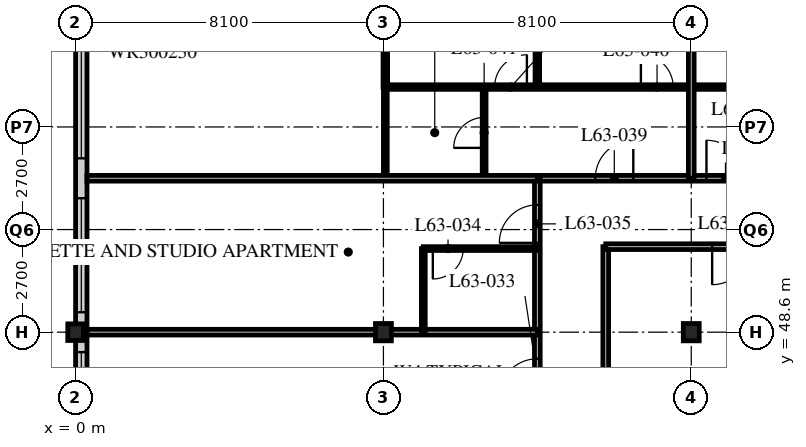
"""IFC4 building model, lengths in metres.
Left out: names, types, materials, properties, quantities, classifications, styles, units other than length and angle.
Written with IfcOpenShell. Run it as: python <this file> out.ifc"""

import sys

from ifc_helpers import new_model, si_unit, direction, frame, frame_2d, origin, origin_2d, place, context, subcontext, project, spatial, rectangle, i_section, extrude, element, fill, save


model = new_model("IFC4")
c1 = context("Model", 3, precision=1e-05, world=origin(), true_north=direction((0.0, 1.0)))
c2 = subcontext(c1, "Body", "Model", "MODEL_VIEW")
j1 = project(units=[si_unit("LENGTHUNIT", "METRE"), si_unit("PLANEANGLEUNIT", "RADIAN")], contexts=[c1])
p1 = place(None, origin())
s1 = spatial("IfcSite", under=j1, at=p1, CompositionType="ELEMENT")
p2 = place(p1, origin())
s2 = spatial("IfcBuilding", under=s1, at=p2, CompositionType="ELEMENT")
p3 = place(p2, frame((0.0, 0.0, 246.3)))
s3 = spatial("IfcBuildingStorey", under=s2, at=p3, CompositionType="ELEMENT", Elevation=246.3)
p4 = place(p3, frame((0.0, 48.6, 0.0), z_axis=(0.0, 0.0, 1.0), x_axis=(1.0, 0.0, 0.0)))
e1 = element("IfcColumn", 1, at=p4, inside=s3, PredefinedType="COLUMN", context=c2, shape_type="SweptSolid", body=[
    extrude(i_section(OverallWidth=0.412, OverallDepth=0.437, WebThickness=0.036, FlangeThickness=0.058, FilletRadius=0.015, at=origin_2d()), origin(), (0.0, 0.0, 1.0), 3.9),
])
for number, where, z_axis, x_axis in (
    (2, (8.1, 48.6, 0.0), (0.0, 0.0, 1.0), (1.0, 0.0, 0.0)),
    (3, (16.2, 48.6, 0.0), (0.0, 0.0, 1.0), (1.0, 0.0, 0.0)),
):
    element("IfcColumn", number, at=place(p3, frame(where, z_axis=z_axis, x_axis=x_axis)), inside=s3, PredefinedType="COLUMN", context=c2, shape_type="SweptSolid", body=[
        extrude(i_section(OverallWidth=0.418, OverallDepth=0.456, WebThickness=0.042, FlangeThickness=0.067, FilletRadius=0.015, at=origin_2d()), origin(), (0.0, 0.0, 1.0), 3.9),
    ])
p5 = place(p3, frame((0.15, 56.4, 0.0), z_axis=(0.0, 0.0, 1.0), x_axis=(0.0, -1.0, 0.0)))
e4 = element("IfcWall", 4, at=p5, inside=s3, PredefinedType="SOLIDWALL", context=c2, shape_type="SweptSolid", body=[
    extrude(rectangle(XDim=32.1, YDim=0.3, at=frame_2d((16.05, 0.0))), origin(), (0.0, 0.0, 1.0), 3.69),
])
p6 = place(p5, frame((0.225, 0.0, 0.6)))
e5 = element("IfcOpeningElement", 5, at=p6, cuts=e4, PredefinedType="OPENING", context=c2, shape_type="SweptSolid", body=[
    extrude(rectangle(XDim=3.0, YDim=2.4, at=frame_2d((1.5, 1.2))), frame((0.0, 0.16, 0.0), z_axis=(0.0, -1.0, 0.0), x_axis=(1.0, 0.0, 0.0)), (0.0, 0.0, 1.0), 0.32),
])
p7 = place(p5, frame((4.275, 0.0, 0.6)))
e6 = element("IfcOpeningElement", 6, at=p7, cuts=e4, PredefinedType="OPENING", context=c2, shape_type="SweptSolid", body=[
    extrude(rectangle(XDim=3.0, YDim=2.4, at=frame_2d((1.5, 1.2))), frame((0.0, 0.16, 0.0), z_axis=(0.0, -1.0, 0.0), x_axis=(1.0, 0.0, 0.0)), (0.0, 0.0, 1.0), 0.32),
])
p8 = place(p5, frame((8.325, 0.0, 0.6)))
e7 = element("IfcOpeningElement", 7, at=p8, cuts=e4, PredefinedType="OPENING", context=c2, shape_type="SweptSolid", body=[
    extrude(rectangle(XDim=3.0, YDim=2.4, at=frame_2d((1.5, 1.2))), frame((0.0, 0.16, 0.0), z_axis=(0.0, -1.0, 0.0), x_axis=(1.0, 0.0, 0.0)), (0.0, 0.0, 1.0), 0.32),
])
p9 = place(p5, frame((12.375, 0.0, 0.6)))
e8 = element("IfcOpeningElement", 8, at=p9, cuts=e4, PredefinedType="OPENING", context=c2, shape_type="SweptSolid", body=[
    extrude(rectangle(XDim=3.0, YDim=2.4, at=frame_2d((1.5, 1.2))), frame((0.0, 0.16, 0.0), z_axis=(0.0, -1.0, 0.0), x_axis=(1.0, 0.0, 0.0)), (0.0, 0.0, 1.0), 0.32),
])
p10 = place(p5, frame((16.425, 0.0, 0.6)))
e9 = element("IfcOpeningElement", 9, at=p10, cuts=e4, PredefinedType="OPENING", context=c2, shape_type="SweptSolid", body=[
    extrude(rectangle(XDim=3.0, YDim=2.4, at=frame_2d((1.5, 1.2))), frame((0.0, 0.16, 0.0), z_axis=(0.0, -1.0, 0.0), x_axis=(1.0, 0.0, 0.0)), (0.0, 0.0, 1.0), 0.32),
])
p11 = place(p5, frame((20.475, 0.0, 0.6)))
e10 = element("IfcOpeningElement", 10, at=p11, cuts=e4, PredefinedType="OPENING", context=c2, shape_type="SweptSolid", body=[
    extrude(rectangle(XDim=3.0, YDim=2.4, at=frame_2d((1.5, 1.2))), frame((0.0, 0.16, 0.0), z_axis=(0.0, -1.0, 0.0), x_axis=(1.0, 0.0, 0.0)), (0.0, 0.0, 1.0), 0.32),
])
p12 = place(p5, frame((24.525, 0.0, 0.6)))
e11 = element("IfcOpeningElement", 11, at=p12, cuts=e4, PredefinedType="OPENING", context=c2, shape_type="SweptSolid", body=[
    extrude(rectangle(XDim=3.0, YDim=2.4, at=frame_2d((1.5, 1.2))), frame((0.0, 0.16, 0.0), z_axis=(0.0, -1.0, 0.0), x_axis=(1.0, 0.0, 0.0)), (0.0, 0.0, 1.0), 0.32),
])
p13 = place(p5, frame((28.575, 0.0, 0.6)))
e12 = element("IfcOpeningElement", 12, at=p13, cuts=e4, PredefinedType="OPENING", context=c2, shape_type="SweptSolid", body=[
    extrude(rectangle(XDim=3.0, YDim=2.4, at=frame_2d((1.5, 1.2))), frame((0.0, 0.16, 0.0), z_axis=(0.0, -1.0, 0.0), x_axis=(1.0, 0.0, 0.0)), (0.0, 0.0, 1.0), 0.32),
])
p14 = place(p3, frame((12.15, 52.65, 0.0), z_axis=(0.0, 0.0, 1.0), x_axis=(1.0, 0.0, 0.0)))
e13 = element("IfcWall", 13, at=p14, inside=s3, PredefinedType="PARTITIONING", context=c2, shape_type="SweptSolid", body=[
    extrude(rectangle(XDim=24.3, YDim=0.15, at=frame_2d((12.15, 0.0))), origin(), (0.0, 0.0, 1.0), 3.69),
])
p15 = place(p14, frame((4.45, 0.0, 0.0)))
e14 = element("IfcOpeningElement", 14, at=p15, cuts=e13, PredefinedType="OPENING", context=c2, shape_type="SweptSolid", body=[
    extrude(rectangle(XDim=1.0, YDim=2.1, at=frame_2d((0.5, 1.05))), frame((0.0, 0.085, 0.0), z_axis=(0.0, -1.0, 0.0), x_axis=(1.0, 0.0, 0.0)), (0.0, 0.0, 1.0), 0.17),
])
p16 = place(p14, frame((1.525, 0.0, 0.0)))
e15 = element("IfcOpeningElement", 15, at=p16, cuts=e13, PredefinedType="OPENING", context=c2, shape_type="SweptSolid", body=[
    extrude(rectangle(XDim=1.0, YDim=2.1, at=frame_2d((0.5, 1.05))), frame((0.0, 0.085, 0.0), z_axis=(0.0, -1.0, 0.0), x_axis=(1.0, 0.0, 0.0)), (0.0, 0.0, 1.0), 0.17),
])
p17 = place(p3, frame((12.15, 22.5, 0.0), z_axis=(0.0, 0.0, 1.0), x_axis=(0.0, 1.0, 0.0)))
e16 = element("IfcWall", 16, at=p17, inside=s3, PredefinedType="PARTITIONING", context=c2, shape_type="SweptSolid", body=[
    extrude(rectangle(XDim=30.15, YDim=0.15, at=frame_2d((15.075, 0.0))), origin(), (0.0, 0.0, 1.0), 3.69),
])
p18 = place(p17, frame((0.4, 0.0, 0.0)))
e17 = element("IfcOpeningElement", 17, at=p18, cuts=e16, PredefinedType="OPENING", context=c2, shape_type="SweptSolid", body=[
    extrude(rectangle(XDim=1.0, YDim=2.1, at=frame_2d((0.5, 1.05))), frame((0.0, 0.085, 0.0), z_axis=(0.0, -1.0, 0.0), x_axis=(1.0, 0.0, 0.0)), (0.0, 0.0, 1.0), 0.17),
])
p19 = place(p17, frame((24.4, 0.0, 0.0)))
e18 = element("IfcOpeningElement", 18, at=p19, cuts=e16, PredefinedType="OPENING", context=c2, shape_type="SweptSolid", body=[
    extrude(rectangle(XDim=1.0, YDim=2.1, at=frame_2d((0.5, 1.05))), frame((0.0, 0.085, 0.0), z_axis=(0.0, -1.0, 0.0), x_axis=(1.0, 0.0, 0.0)), (0.0, 0.0, 1.0), 0.17),
])
p20 = place(p17, frame((28.45, 0.0, 0.0)))
e19 = element("IfcOpeningElement", 19, at=p20, cuts=e16, PredefinedType="OPENING", context=c2, shape_type="SweptSolid", body=[
    extrude(rectangle(XDim=1.0, YDim=2.1, at=frame_2d((0.5, 1.05))), frame((0.0, 0.085, 0.0), z_axis=(0.0, -1.0, 0.0), x_axis=(1.0, 0.0, 0.0)), (0.0, 0.0, 1.0), 0.17),
])
p21 = place(p3, frame((13.95, 24.3, 0.0), z_axis=(0.0, 0.0, 1.0), x_axis=(0.0, 1.0, 0.0)))
e20 = element("IfcWall", 20, at=p21, inside=s3, PredefinedType="PARTITIONING", context=c2, shape_type="SweptSolid", body=[
    extrude(rectangle(XDim=26.55, YDim=0.15, at=frame_2d((13.275, 0.0))), origin(), (0.0, 0.0, 1.0), 3.69),
])
p22 = place(p21, frame((3.55, 0.0, 0.0)))
e21 = element("IfcOpeningElement", 21, at=p22, cuts=e20, PredefinedType="OPENING", context=c2, shape_type="SweptSolid", body=[
    extrude(rectangle(XDim=1.0, YDim=2.1, at=frame_2d((0.5, 1.05))), frame((0.0, 0.085, 0.0), z_axis=(0.0, -1.0, 0.0), x_axis=(1.0, 0.0, 0.0)), (0.0, 0.0, 1.0), 0.17),
])
p23 = place(p21, frame((11.65, 0.0, 0.0)))
e22 = element("IfcOpeningElement", 22, at=p23, cuts=e20, PredefinedType="OPENING", context=c2, shape_type="SweptSolid", body=[
    extrude(rectangle(XDim=1.0, YDim=2.1, at=frame_2d((0.5, 1.05))), frame((0.0, 0.085, 0.0), z_axis=(0.0, -1.0, 0.0), x_axis=(1.0, 0.0, 0.0)), (0.0, 0.0, 1.0), 0.17),
])
p24 = place(p3, frame((13.95, 50.85, 0.0), z_axis=(0.0, 0.0, 1.0), x_axis=(1.0, 0.0, 0.0)))
e23 = element("IfcWall", 23, at=p24, inside=s3, PredefinedType="PARTITIONING", context=c2, shape_type="SweptSolid", body=[
    extrude(rectangle(XDim=13.19, YDim=0.15, at=frame_2d((6.595, 0.0))), origin(), (0.0, 0.0, 1.0), 3.69),
])
p25 = place(p24, frame((2.8, 0.0, 0.0)))
e24 = element("IfcOpeningElement", 24, at=p25, cuts=e23, PredefinedType="OPENING", context=c2, shape_type="SweptSolid", body=[
    extrude(rectangle(XDim=1.0, YDim=2.1, at=frame_2d((0.5, 1.05))), frame((0.0, 0.085, 0.0), z_axis=(0.0, -1.0, 0.0), x_axis=(1.0, 0.0, 0.0)), (0.0, 0.0, 1.0), 0.17),
])
p26 = place(p24, frame((9.4, 0.0, 0.0)))
e25 = element("IfcOpeningElement", 25, at=p26, cuts=e23, PredefinedType="OPENING", context=c2, shape_type="SweptSolid", body=[
    extrude(rectangle(XDim=1.0, YDim=2.1, at=frame_2d((0.5, 1.05))), frame((0.0, 0.085, 0.0), z_axis=(0.0, -1.0, 0.0), x_axis=(1.0, 0.0, 0.0)), (0.0, 0.0, 1.0), 0.17),
])
p27 = place(p3, frame((12.15, 48.6, 0.0), z_axis=(0.0, 0.0, 1.0), x_axis=(-1.0, 0.0, 0.0)))
e26 = element("IfcWall", 26, at=p27, inside=s3, PredefinedType="PARTITIONING", context=c2, shape_type="SweptSolid", body=[
    extrude(rectangle(XDim=11.85, YDim=0.15, at=frame_2d((5.925, 0.0))), origin(), (0.0, 0.0, 1.0), 3.078),
])
p28 = place(p3, frame((9.15, 48.6, 0.0), z_axis=(0.0, 0.0, 1.0), x_axis=(0.0, 1.0, 0.0)))
e27 = element("IfcWall", 27, at=p28, inside=s3, PredefinedType="PARTITIONING", context=c2, shape_type="SweptSolid", body=[
    extrude(rectangle(XDim=2.2, YDim=0.1, at=frame_2d((1.1, 0.0))), origin(), (0.0, 0.0, 1.0), 3.69),
])
p29 = place(p3, frame((12.15, 50.8, 0.0), z_axis=(0.0, 0.0, 1.0), x_axis=(-1.0, 0.0, 0.0)))
e28 = element("IfcWall", 28, at=p29, inside=s3, PredefinedType="PARTITIONING", context=c2, shape_type="SweptSolid", body=[
    extrude(rectangle(XDim=3.0, YDim=0.1, at=frame_2d((1.5, 0.0))), origin(), (0.0, 0.0, 1.0), 3.69),
])
p30 = place(p29, frame((1.95, 0.0, 0.0)))
e29 = element("IfcOpeningElement", 29, at=p30, cuts=e28, PredefinedType="OPENING", context=c2, shape_type="SweptSolid", body=[
    extrude(rectangle(XDim=0.8, YDim=2.1, at=frame_2d((0.4, 1.05))), frame((0.0, 0.06, 0.0), z_axis=(0.0, -1.0, 0.0), x_axis=(1.0, 0.0, 0.0)), (0.0, 0.0, 1.0), 0.12),
])
p31 = place(p3, frame((10.75, 52.65, 0.0), z_axis=(0.0, 0.0, 1.0), x_axis=(0.0, 1.0, 0.0)))
e30 = element("IfcWall", 30, at=p31, inside=s3, PredefinedType="PARTITIONING", context=c2, shape_type="SweptSolid", body=[
    extrude(rectangle(XDim=2.4, YDim=0.1, at=frame_2d((1.2, 0.0))), origin(), (0.0, 0.0, 1.0), 3.69),
])
p32 = place(p31, frame((0.8, 0.0, 0.0)))
e31 = element("IfcOpeningElement", 31, at=p32, cuts=e30, PredefinedType="OPENING", context=c2, shape_type="SweptSolid", body=[
    extrude(rectangle(XDim=0.8, YDim=2.1, at=frame_2d((0.4, 1.05))), frame((0.0, 0.06, 0.0), z_axis=(0.0, -1.0, 0.0), x_axis=(1.0, 0.0, 0.0)), (0.0, 0.0, 1.0), 0.12),
])
p33 = place(p3, frame((8.15, 52.65, 0.0), z_axis=(0.0, 0.0, 1.0), x_axis=(0.0, 1.0, 0.0)))
e32 = element("IfcWall", 32, at=p33, inside=s3, PredefinedType="PARTITIONING", context=c2, shape_type="SweptSolid", body=[
    extrude(rectangle(XDim=2.4, YDim=0.1, at=frame_2d((1.2, 0.0))), origin(), (0.0, 0.0, 1.0), 3.078),
])
p34 = place(p3, frame((8.15, 55.05, 0.0), z_axis=(0.0, 0.0, 1.0), x_axis=(1.0, 0.0, 0.0)))
e33 = element("IfcWall", 33, at=p34, inside=s3, PredefinedType="PARTITIONING", context=c2, shape_type="SweptSolid", body=[
    extrude(rectangle(XDim=28.3, YDim=0.12, at=frame_2d((14.15, 0.0))), origin(), (0.0, 0.0, 1.0), 3.69),
])
p35 = place(p34, frame((9.025, 0.0, 0.0)))
e34 = element("IfcOpeningElement", 34, at=p35, cuts=e33, PredefinedType="OPENING", context=c2, shape_type="SweptSolid", body=[
    extrude(rectangle(XDim=0.85, YDim=2.1, at=frame_2d((0.425, 1.05))), frame((0.0, 0.07, 0.0), z_axis=(0.0, -1.0, 0.0), x_axis=(1.0, 0.0, 0.0)), (0.0, 0.0, 1.0), 0.14),
])
p36 = place(p34, frame((16.475, 0.0, 0.0)))
e35 = element("IfcOpeningElement", 35, at=p36, cuts=e33, PredefinedType="OPENING", context=c2, shape_type="SweptSolid", body=[
    extrude(rectangle(XDim=0.85, YDim=2.1, at=frame_2d((0.425, 1.05))), frame((0.0, 0.07, 0.0), z_axis=(0.0, -1.0, 0.0), x_axis=(1.0, 0.0, 0.0)), (0.0, 0.0, 1.0), 0.14),
])
p37 = place(p34, frame((20.525, 0.0, 0.0)))
e36 = element("IfcOpeningElement", 36, at=p37, cuts=e33, PredefinedType="OPENING", context=c2, shape_type="SweptSolid", body=[
    extrude(rectangle(XDim=0.85, YDim=2.1, at=frame_2d((0.425, 1.05))), frame((0.0, 0.07, 0.0), z_axis=(0.0, -1.0, 0.0), x_axis=(1.0, 0.0, 0.0)), (0.0, 0.0, 1.0), 0.14),
])
p38 = place(p34, frame((24.575, 0.0, 0.0)))
e37 = element("IfcOpeningElement", 37, at=p38, cuts=e33, PredefinedType="OPENING", context=c2, shape_type="SweptSolid", body=[
    extrude(rectangle(XDim=0.85, YDim=2.1, at=frame_2d((0.425, 1.05))), frame((0.0, 0.07, 0.0), z_axis=(0.0, -1.0, 0.0), x_axis=(1.0, 0.0, 0.0)), (0.0, 0.0, 1.0), 0.14),
])
p39 = place(p34, frame((6.725, 0.0, 0.0)))
e38 = element("IfcOpeningElement", 38, at=p39, cuts=e33, PredefinedType="OPENING", context=c2, shape_type="SweptSolid", body=[
    extrude(rectangle(XDim=0.85, YDim=2.1, at=frame_2d((0.425, 1.05))), frame((0.0, 0.07, 0.0), z_axis=(0.0, -1.0, 0.0), x_axis=(1.0, 0.0, 0.0)), (0.0, 0.0, 1.0), 0.14),
])
p40 = place(p34, frame((2.875, 0.0, 0.0)))
e39 = element("IfcOpeningElement", 39, at=p40, cuts=e33, PredefinedType="OPENING", context=c2, shape_type="SweptSolid", body=[
    extrude(rectangle(XDim=0.85, YDim=2.1, at=frame_2d((0.425, 1.05))), frame((0.0, 0.07, 0.0), z_axis=(0.0, -1.0, 0.0), x_axis=(1.0, 0.0, 0.0)), (0.0, 0.0, 1.0), 0.14),
])
p41 = place(p3, frame((12.15, 55.05, 0.0), z_axis=(0.0, 0.0, 1.0), x_axis=(0.0, 1.0, 0.0)))
e40 = element("IfcWall", 40, at=p41, inside=s3, PredefinedType="PARTITIONING", context=c2, shape_type="SweptSolid", body=[
    extrude(rectangle(XDim=9.45, YDim=0.12, at=frame_2d((4.725, 0.0))), origin(), (0.0, 0.0, 1.0), 3.69),
])
p42 = place(p3, frame((0.3, 52.65, 0.0), z_axis=(0.0, 0.0, 1.0), x_axis=(1.0, 0.0, 0.0)))
e41 = element("IfcWall", 41, at=p42, inside=s3, PredefinedType="PARTITIONING", context=c2, shape_type="SweptSolid", body=[
    extrude(rectangle(XDim=11.85, YDim=0.15, at=frame_2d((5.925, 0.0))), origin(), (0.0, 0.0, 1.0), 3.69),
])
p43 = place(p3, frame((16.2, 52.65, 0.0), z_axis=(0.0, 0.0, 1.0), x_axis=(0.0, 1.0, 0.0)))
e42 = element("IfcWall", 42, at=p43, inside=s3, PredefinedType="PARTITIONING", context=c2, shape_type="SweptSolid", body=[
    extrude(rectangle(XDim=11.85, YDim=0.15, at=frame_2d((5.925, 0.0))), origin(), (0.0, 0.0, 1.0), 3.078),
])
p44 = place(p3, frame((8.15, 55.05, 0.0), z_axis=(0.0, 0.0, 1.0), x_axis=(0.0, 1.0, 0.0)))
e43 = element("IfcWall", 43, at=p44, inside=s3, PredefinedType="PARTITIONING", context=c2, shape_type="SweptSolid", body=[
    extrude(rectangle(XDim=1.447, YDim=0.12, at=frame_2d((0.724, 0.0))), origin(), (0.0, 0.0, 1.0), 3.078),
])
p45 = place(p6, origin())
e44 = element("IfcWindow", 44, at=p45, inside=s3, PartitioningType="SINGLE_PANEL", PredefinedType="WINDOW", context=c2, shape_type="SweptSolid", body=[
    extrude(rectangle(XDim=3.0, YDim=2.4, at=frame_2d((1.5, 1.2))), frame((0.0, 0.03, 0.0), z_axis=(0.0, -1.0, 0.0), x_axis=(1.0, 0.0, 0.0)), (0.0, 0.0, 1.0), 0.06),
])
fill(e5, e44)
p46 = place(p7, origin())
e45 = element("IfcWindow", 45, at=p46, inside=s3, PartitioningType="SINGLE_PANEL", PredefinedType="WINDOW", context=c2, shape_type="SweptSolid", body=[
    extrude(rectangle(XDim=3.0, YDim=2.4, at=frame_2d((1.5, 1.2))), frame((0.0, 0.03, 0.0), z_axis=(0.0, -1.0, 0.0), x_axis=(1.0, 0.0, 0.0)), (0.0, 0.0, 1.0), 0.06),
])
fill(e6, e45)
p47 = place(p8, origin())
e46 = element("IfcWindow", 46, at=p47, inside=s3, PartitioningType="SINGLE_PANEL", PredefinedType="WINDOW", context=c2, shape_type="SweptSolid", body=[
    extrude(rectangle(XDim=3.0, YDim=2.4, at=frame_2d((1.5, 1.2))), frame((0.0, 0.03, 0.0), z_axis=(0.0, -1.0, 0.0), x_axis=(1.0, 0.0, 0.0)), (0.0, 0.0, 1.0), 0.06),
])
fill(e7, e46)
p48 = place(p25, origin())
e47 = element("IfcDoor", 47, at=p48, inside=s3, OperationType="SINGLE_SWING_RIGHT", PredefinedType="DOOR", context=c2, shape_type="SweptSolid", body=[
    extrude(rectangle(XDim=1.0, YDim=2.1, at=frame_2d((0.5, 1.05))), frame((0.0, 0.025, 0.0), z_axis=(0.0, -1.0, 0.0), x_axis=(1.0, 0.0, 0.0)), (0.0, 0.0, 1.0), 0.05),
])
fill(e24, e47)
p49 = place(p15, origin())
e48 = element("IfcDoor", 48, at=p49, inside=s3, OperationType="SINGLE_SWING_LEFT", PredefinedType="DOOR", context=c2, shape_type="SweptSolid", body=[
    extrude(rectangle(XDim=1.0, YDim=2.1, at=frame_2d((0.5, 1.05))), frame((0.0, 0.025, 0.0), z_axis=(0.0, -1.0, 0.0), x_axis=(1.0, 0.0, 0.0)), (0.0, 0.0, 1.0), 0.05),
])
fill(e14, e48)
p50 = place(p19, origin())
e49 = element("IfcDoor", 49, at=p50, inside=s3, OperationType="SINGLE_SWING_LEFT", PredefinedType="DOOR", context=c2, shape_type="SweptSolid", body=[
    extrude(rectangle(XDim=1.0, YDim=2.1, at=frame_2d((0.5, 1.05))), frame((0.0, 0.025, 0.0), z_axis=(0.0, -1.0, 0.0), x_axis=(1.0, 0.0, 0.0)), (0.0, 0.0, 1.0), 0.05),
])
fill(e18, e49)
p51 = place(p30, origin())
e50 = element("IfcDoor", 50, at=p51, inside=s3, OperationType="SINGLE_SWING_RIGHT", PredefinedType="DOOR", context=c2, shape_type="SweptSolid", body=[
    extrude(rectangle(XDim=0.8, YDim=2.1, at=frame_2d((0.4, 1.05))), frame((0.0, 0.025, 0.0), z_axis=(0.0, -1.0, 0.0), x_axis=(1.0, 0.0, 0.0)), (0.0, 0.0, 1.0), 0.05),
])
fill(e29, e50)
p52 = place(p20, origin())
e51 = element("IfcDoor", 51, at=p52, inside=s3, OperationType="SINGLE_SWING_LEFT", PredefinedType="DOOR", context=c2, shape_type="SweptSolid", body=[
    extrude(rectangle(XDim=1.0, YDim=2.1, at=frame_2d((0.5, 1.05))), frame((0.0, 0.025, 0.0), z_axis=(0.0, -1.0, 0.0), x_axis=(1.0, 0.0, 0.0)), (0.0, 0.0, 1.0), 0.05),
])
fill(e19, e51)
p53 = place(p16, origin())
e52 = element("IfcDoor", 52, at=p53, inside=s3, OperationType="SINGLE_SWING_RIGHT", PredefinedType="DOOR", context=c2, shape_type="SweptSolid", body=[
    extrude(rectangle(XDim=1.0, YDim=2.1, at=frame_2d((0.5, 1.05))), frame((0.0, 0.025, 0.0), z_axis=(0.0, -1.0, 0.0), x_axis=(1.0, 0.0, 0.0)), (0.0, 0.0, 1.0), 0.05),
])
fill(e15, e52)
p54 = place(p39, origin())
e53 = element("IfcDoor", 53, at=p54, inside=s3, OperationType="SINGLE_SWING_LEFT", PredefinedType="DOOR", context=c2, shape_type="SweptSolid", body=[
    extrude(rectangle(XDim=0.85, YDim=2.1, at=frame_2d((0.425, 1.05))), frame((0.0, 0.025, 0.0), z_axis=(0.0, -1.0, 0.0), x_axis=(1.0, 0.0, 0.0)), (0.0, 0.0, 1.0), 0.05),
])
fill(e38, e53)
p55 = place(p32, origin())
e54 = element("IfcDoor", 54, at=p55, inside=s3, OperationType="SINGLE_SWING_LEFT", PredefinedType="DOOR", context=c2, shape_type="SweptSolid", body=[
    extrude(rectangle(XDim=0.8, YDim=2.1, at=frame_2d((0.4, 1.05))), frame((0.0, 0.025, 0.0), z_axis=(0.0, -1.0, 0.0), x_axis=(1.0, 0.0, 0.0)), (0.0, 0.0, 1.0), 0.05),
])
fill(e31, e54)
p56 = place(p40, origin())
e55 = element("IfcDoor", 55, at=p56, inside=s3, OperationType="SINGLE_SWING_RIGHT", PredefinedType="DOOR", context=c2, shape_type="SweptSolid", body=[
    extrude(rectangle(XDim=0.85, YDim=2.1, at=frame_2d((0.425, 1.05))), frame((0.0, 0.025, 0.0), z_axis=(0.0, -1.0, 0.0), x_axis=(1.0, 0.0, 0.0)), (0.0, 0.0, 1.0), 0.05),
])
fill(e39, e55)
save(model, sys.argv[1])
